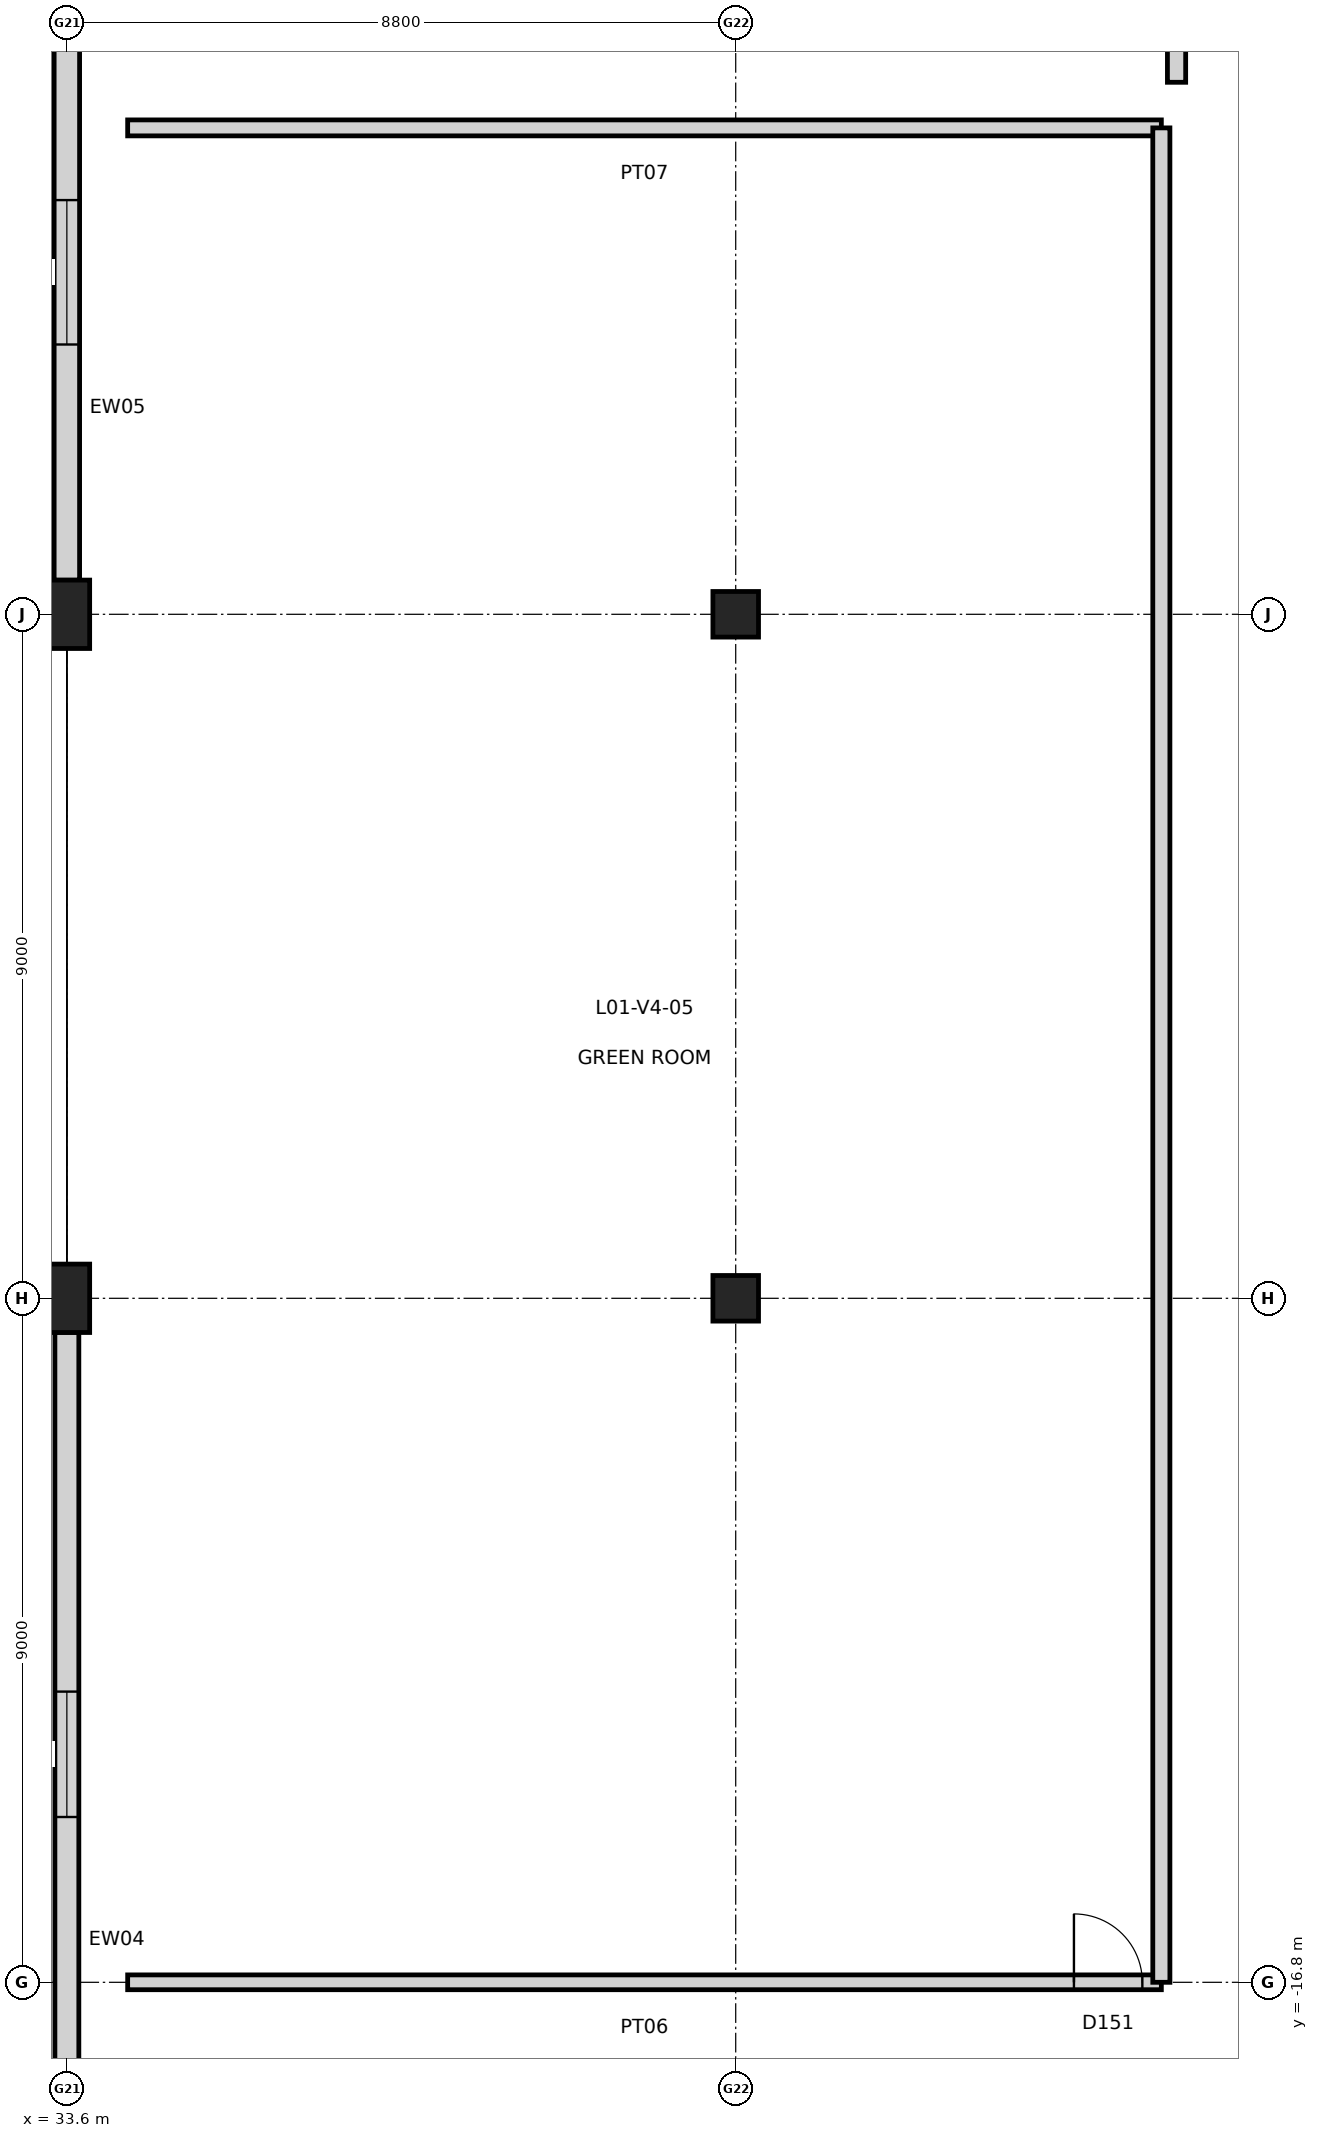
"""IFC4 building model, lengths in metres.
Left out: names, types, materials, properties, quantities, classifications, styles, units other than length and angle.
Written with IfcOpenShell. Run it as: python <this file> out.ifc"""

import sys

from ifc_helpers import new_model, si_unit, direction, frame, frame_2d, origin, origin_2d, place, context, subcontext, project, spatial, rectangle, extrude, element, fill, save


model = new_model("IFC4")
c1 = context("Model", 3, precision=1e-05, world=origin(), true_north=direction((0.0, 1.0)))
c2 = subcontext(c1, "Body", "Model", "MODEL_VIEW")
j1 = project(units=[si_unit("LENGTHUNIT", "METRE"), si_unit("PLANEANGLEUNIT", "RADIAN")], contexts=[c1])
p1 = place(None, origin())
s1 = spatial("IfcSite", under=j1, at=p1, CompositionType="ELEMENT")
p2 = place(p1, origin())
s2 = spatial("IfcBuilding", under=s1, at=p2, CompositionType="ELEMENT")
p3 = place(p2, frame((0.0, 0.0, 5.4)))
s3 = spatial("IfcBuildingStorey", under=s2, at=p3, CompositionType="ELEMENT", Elevation=5.4)
for number, where, z_axis, x_axis in (
    (1, (33.6, -7.8, 0.0), (0.0, 0.0, 1.0), (1.0, 0.0, 0.0)),
    (2, (33.6, 1.2, 0.0), (0.0, 0.0, 1.0), (1.0, 0.0, 0.0)),
):
    element("IfcColumn", number, at=place(p3, frame(where, z_axis=z_axis, x_axis=x_axis)), inside=s3, PredefinedType="COLUMN", context=c2, shape_type="SweptSolid", body=[
        extrude(rectangle(XDim=0.6, YDim=0.9, at=origin_2d()), origin(), (0.0, 0.0, 1.0), 4.8),
    ])
for number, where, z_axis, x_axis in (
    (3, (42.4, -7.8, 0.0), (0.0, 0.0, 1.0), (1.0, 0.0, 0.0)),
    (4, (42.4, 1.2, 0.0), (0.0, 0.0, 1.0), (1.0, 0.0, 0.0)),
):
    element("IfcColumn", number, at=place(p3, frame(where, z_axis=z_axis, x_axis=x_axis)), inside=s3, PredefinedType="COLUMN", context=c2, shape_type="SweptSolid", body=[
        extrude(rectangle(XDim=0.6, YDim=0.6, at=origin_2d()), origin(), (0.0, 0.0, 1.0), 4.8),
    ])
p4 = place(p3, frame((33.6, -19.352, 0.0), z_axis=(0.0, 0.0, 1.0), x_axis=(0.0, 1.0, 0.0)))
e5 = element("IfcWall", 5, at=p4, inside=s3, PredefinedType="STANDARD", context=c2, shape_type="SweptSolid", body=[
    extrude(rectangle(XDim=11.104, YDim=0.315, at=frame_2d((5.552, 0.0))), origin(), (0.0, 0.0, 1.0), 3.74),
])
p5 = place(p4, frame((4.727, 0.0, 0.85)))
e6 = element("IfcOpeningElement", 6, at=p5, cuts=e5, PredefinedType="OPENING", context=c2, shape_type="SweptSolid", body=[
    extrude(rectangle(XDim=1.65, YDim=2.1, at=frame_2d((0.825, 1.05))), frame((0.0, 0.167, 0.0), z_axis=(0.0, -1.0, 0.0), x_axis=(1.0, 0.0, 0.0)), (0.0, 0.0, 1.0), 0.335),
])
p6 = place(p3, frame((33.6, 1.648, 0.0), z_axis=(0.0, 0.0, 1.0), x_axis=(0.0, 1.0, 0.0)))
e7 = element("IfcWall", 7, at=p6, inside=s3, PredefinedType="STANDARD", context=c2, shape_type="SweptSolid", body=[
    extrude(rectangle(XDim=8.104, YDim=0.335, at=frame_2d((4.052, 0.0))), origin(), (0.0, 0.0, 1.0), 3.824),
])
p7 = place(p6, frame((3.102, 0.0, 0.85)))
e8 = element("IfcOpeningElement", 8, at=p7, cuts=e7, PredefinedType="OPENING", context=c2, shape_type="SweptSolid", body=[
    extrude(rectangle(XDim=1.9, YDim=2.1, at=frame_2d((0.95, 1.05))), frame((0.0, 0.177, 0.0), z_axis=(0.0, -1.0, 0.0), x_axis=(1.0, 0.0, 0.0)), (0.0, 0.0, 1.0), 0.355),
])
p8 = place(p3, frame((34.4, -16.8, 0.0), z_axis=(0.0, 0.0, 1.0), x_axis=(1.0, 0.0, 0.0)))
e9 = element("IfcWall", 9, at=p8, inside=s3, PredefinedType="PARTITIONING", context=c2, shape_type="SweptSolid", body=[
    extrude(rectangle(XDim=13.6, YDim=0.195, at=frame_2d((6.8, 0.0))), origin(), (0.0, 0.0, 1.0), 4.42),
])
p9 = place(p8, frame((12.45, 0.0, 0.0)))
e10 = element("IfcOpeningElement", 10, at=p9, cuts=e9, PredefinedType="OPENING", context=c2, shape_type="SweptSolid", body=[
    extrude(rectangle(XDim=0.9, YDim=2.1, at=frame_2d((0.45, 1.05))), frame((0.0, 0.107, 0.0), z_axis=(0.0, -1.0, 0.0), x_axis=(1.0, 0.0, 0.0)), (0.0, 0.0, 1.0), 0.215),
])
p10 = place(p3, frame((34.4, 7.6, 0.0), z_axis=(0.0, 0.0, 1.0), x_axis=(1.0, 0.0, 0.0)))
e11 = element("IfcWall", 11, at=p10, inside=s3, PredefinedType="PARTITIONING", context=c2, shape_type="SweptSolid", body=[
    extrude(rectangle(XDim=13.6, YDim=0.21, at=frame_2d((6.8, 0.0))), origin(), (0.0, 0.0, 1.0), 4.42),
])
p11 = place(p3, frame((48.0, -16.8, 0.0), z_axis=(0.0, 0.0, 1.0), x_axis=(0.0, 1.0, 0.0)))
e12 = element("IfcWall", 12, at=p11, inside=s3, PredefinedType="PARTITIONING", context=c2, shape_type="SweptSolid", body=[
    extrude(rectangle(XDim=24.4, YDim=0.225, at=frame_2d((12.2, 0.0))), origin(), (0.0, 0.0, 1.0), 4.018),
])
p12 = place(p3, frame((48.2, 8.2, 0.0), z_axis=(0.0, 0.0, 1.0), x_axis=(0.0, 1.0, 0.0)))
e13 = element("IfcWall", 13, at=p12, inside=s3, PredefinedType="PARTITIONING", context=c2, shape_type="SweptSolid", body=[
    extrude(rectangle(XDim=11.1, YDim=0.24, at=frame_2d((5.55, 0.0))), origin(), (0.0, 0.0, 1.0), 4.42),
])
p13 = place(p12, frame((5.08, 0.0, 0.0)))
e14 = element("IfcOpeningElement", 14, at=p13, cuts=e13, PredefinedType="OPENING", context=c2, shape_type="SweptSolid", body=[
    extrude(rectangle(XDim=0.94, YDim=2.1, at=frame_2d((0.47, 1.05))), frame((0.0, 0.13, 0.0), z_axis=(0.0, -1.0, 0.0), x_axis=(1.0, 0.0, 0.0)), (0.0, 0.0, 1.0), 0.26),
])
p14 = place(p5, origin())
e15 = element("IfcWindow", 15, at=p14, inside=s3, PartitioningType="SINGLE_PANEL", PredefinedType="WINDOW", context=c2, shape_type="SweptSolid", body=[
    extrude(rectangle(XDim=1.65, YDim=2.1, at=frame_2d((0.825, 1.05))), frame((0.0, 0.03, 0.0), z_axis=(0.0, -1.0, 0.0), x_axis=(1.0, 0.0, 0.0)), (0.0, 0.0, 1.0), 0.06),
])
fill(e6, e15)
p15 = place(p7, origin())
e16 = element("IfcWindow", 16, at=p15, inside=s3, PartitioningType="SINGLE_PANEL", PredefinedType="WINDOW", context=c2, shape_type="SweptSolid", body=[
    extrude(rectangle(XDim=1.9, YDim=2.1, at=frame_2d((0.95, 1.05))), frame((0.0, 0.03, 0.0), z_axis=(0.0, -1.0, 0.0), x_axis=(1.0, 0.0, 0.0)), (0.0, 0.0, 1.0), 0.06),
])
fill(e8, e16)
p16 = place(p9, origin())
e17 = element("IfcDoor", 17, at=p16, inside=s3, OperationType="SINGLE_SWING_LEFT", PredefinedType="DOOR", context=c2, shape_type="SweptSolid", body=[
    extrude(rectangle(XDim=0.9, YDim=2.1, at=frame_2d((0.45, 1.05))), frame((0.0, 0.025, 0.0), z_axis=(0.0, -1.0, 0.0), x_axis=(1.0, 0.0, 0.0)), (0.0, 0.0, 1.0), 0.05),
])
fill(e10, e17)
save(model, sys.argv[1])
